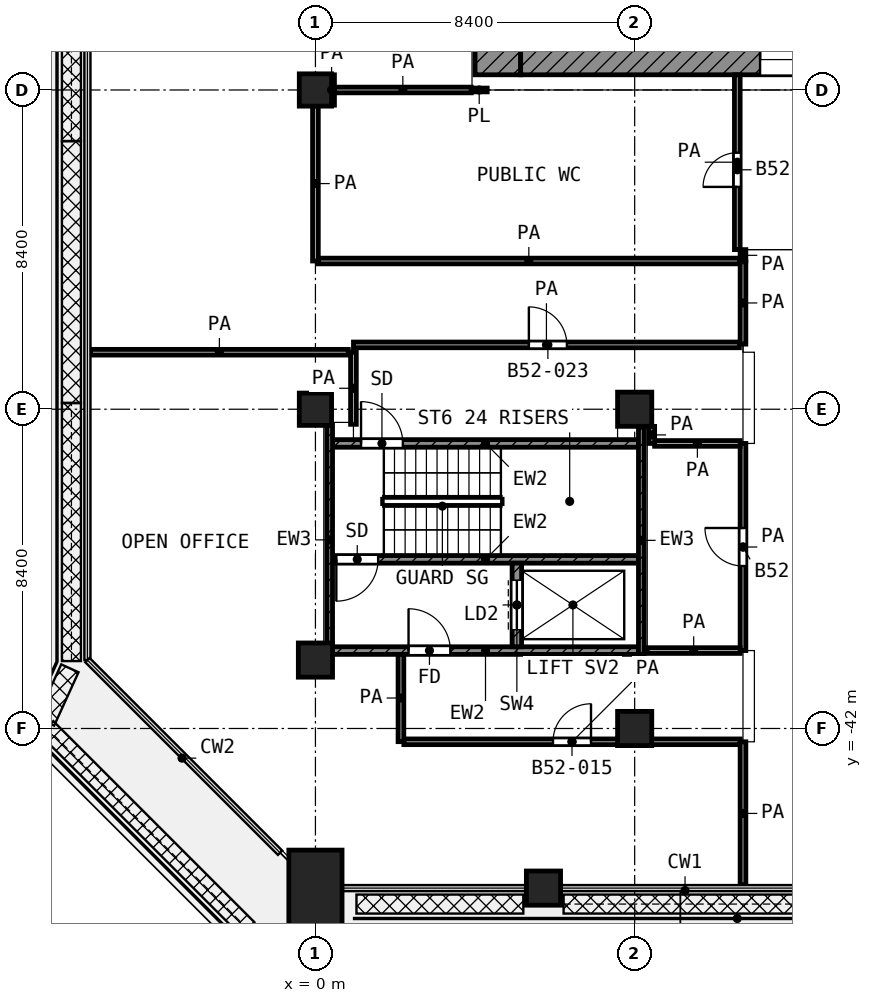
"""IFC4 building model, lengths in metres.
Left out: names, types, materials, properties, quantities, classifications, styles, units other than length and angle.
Written with IfcOpenShell. Run it as: python <this file> out.ifc"""

import sys

from ifc_helpers import new_model, si_unit, direction, frame, frame_2d, origin, origin_2d, place, context, subcontext, project, spatial, rectangle, extrude, element, fill, save


model = new_model("IFC4")
c1 = context("Model", 3, precision=1e-05, world=origin(), true_north=direction((0.0, 1.0)))
c2 = subcontext(c1, "Body", "Model", "MODEL_VIEW")
j1 = project(units=[si_unit("LENGTHUNIT", "METRE"), si_unit("PLANEANGLEUNIT", "RADIAN")], contexts=[c1])
p1 = place(None, origin())
s1 = spatial("IfcSite", under=j1, at=p1, CompositionType="ELEMENT")
p2 = place(p1, origin())
s2 = spatial("IfcBuilding", under=s1, at=p2, CompositionType="ELEMENT")
p3 = place(p2, frame((0.0, 0.0, 226.4)))
s3 = spatial("IfcBuildingStorey", under=s2, at=p3, CompositionType="ELEMENT", Elevation=226.4)
for number, where, z_axis, x_axis in (
    (1, (0.0, -25.2, 0.0), (0.0, 0.0, 1.0), (1.0, 0.0, 0.0)),
    (2, (0.0, -33.6, 0.0), (0.0, 0.0, 1.0), (1.0, 0.0, 0.0)),
):
    element("IfcColumn", number, at=place(p3, frame(where, z_axis=z_axis, x_axis=x_axis)), inside=s3, PredefinedType="COLUMN", context=c2, shape_type="SweptSolid", body=[
        extrude(rectangle(XDim=0.85, YDim=0.85, at=origin_2d()), origin(), (0.0, 0.0, 1.0), 4.2),
    ])
for number, where, z_axis, x_axis in (
    (3, (8.4, -33.6, 0.0), (0.0, 0.0, 1.0), (1.0, 0.0, 0.0)),
    (4, (0.0, -40.2, 0.0), (0.0, 0.0, 1.0), (1.0, 0.0, 0.0)),
    (5, (8.4, -42.0, 0.0), (0.0, 0.0, 1.0), (1.0, 0.0, 0.0)),
    (6, (6.0, -46.2, 0.0), (0.0, 0.0, 1.0), (1.0, 0.0, 0.0)),
):
    element("IfcColumn", number, at=place(p3, frame(where, z_axis=z_axis, x_axis=x_axis)), inside=s3, PredefinedType="COLUMN", context=c2, shape_type="SweptSolid", body=[
        extrude(rectangle(XDim=0.9, YDim=0.9, at=origin_2d()), origin(), (0.0, 0.0, 1.0), 4.2),
    ])
p4 = place(p3, frame((0.0, -46.2, 0.0), z_axis=(0.0, 0.0, 1.0), x_axis=(0.0, 1.0, 0.0)))
e7 = element("IfcColumn", 7, at=p4, inside=s3, PredefinedType="COLUMN", context=c2, shape_type="SweptSolid", body=[
    extrude(rectangle(XDim=2.0, YDim=1.4, at=origin_2d()), origin(), (0.0, 0.0, 1.0), 4.2),
])
p5 = place(p3, frame((4.8, -24.8, 0.0), z_axis=(0.0, 0.0, 1.0), x_axis=(0.0, 1.0, 0.0)))
e8 = element("IfcWall", 8, at=p5, inside=s3, PredefinedType="SHEAR", context=c2, shape_type="SweptSolid", body=[
    extrude(rectangle(XDim=19.4, YDim=1.2, at=frame_2d((9.7, 0.0))), origin(), (0.0, 0.0, 1.0), 3.6),
])
p6 = place(p5, frame((11.25, 0.0, 0.0)))
e9 = element("IfcOpeningElement", 9, at=p6, cuts=e8, PredefinedType="OPENING", context=c2, shape_type="SweptSolid", body=[
    extrude(rectangle(XDim=1.1, YDim=2.1, at=frame_2d((0.55, 1.05))), frame((0.0, 0.61, 0.0), z_axis=(0.0, -1.0, 0.0), x_axis=(1.0, 0.0, 0.0)), (0.0, 0.0, 1.0), 1.22),
])
p7 = place(p5, frame((1.95, 0.0, 0.0)))
e10 = element("IfcOpeningElement", 10, at=p7, cuts=e8, PredefinedType="OPENING", context=c2, shape_type="SweptSolid", body=[
    extrude(rectangle(XDim=1.1, YDim=2.1, at=frame_2d((0.55, 1.05))), frame((0.0, 0.61, 0.0), z_axis=(0.0, -1.0, 0.0), x_axis=(1.0, 0.0, 0.0)), (0.0, 0.0, 1.0), 1.22),
])
p8 = place(p3, frame((5.4, -24.4, 0.0), z_axis=(0.0, 0.0, 1.0), x_axis=(1.0, 0.0, 0.0)))
e11 = element("IfcWall", 11, at=p8, inside=s3, PredefinedType="SHEAR", context=c2, shape_type="SweptSolid", body=[
    extrude(rectangle(XDim=18.6, YDim=0.8, at=frame_2d((9.3, 0.0))), origin(), (0.0, 0.0, 1.0), 3.6),
])
p9 = place(p8, frame((6.3, 0.0, 0.0)))
e12 = element("IfcOpeningElement", 12, at=p9, cuts=e11, PredefinedType="OPENING", context=c2, shape_type="SweptSolid", body=[
    extrude(rectangle(XDim=1.8, YDim=2.1, at=frame_2d((0.9, 1.05))), frame((0.0, 0.41, 0.0), z_axis=(0.0, -1.0, 0.0), x_axis=(1.0, 0.0, 0.0)), (0.0, 0.0, 1.0), 0.82),
])
p10 = place(p3, frame((0.375, -40.05, 0.0), z_axis=(0.0, 0.0, 1.0), x_axis=(0.0, 1.0, 0.0)))
e13 = element("IfcWall", 13, at=p10, inside=s3, PredefinedType="SHEAR", context=c2, shape_type="SweptSolid", body=[
    extrude(rectangle(XDim=6.025, YDim=0.15, at=frame_2d((3.013, 0.0))), origin(), (0.0, 0.0, 1.0), 3.6),
])
p11 = place(p3, frame((8.575, -40.05, 0.0), z_axis=(0.0, 0.0, 1.0), x_axis=(0.0, 1.0, 0.0)))
e14 = element("IfcWall", 14, at=p11, inside=s3, PredefinedType="SHEAR", context=c2, shape_type="SweptSolid", body=[
    extrude(rectangle(XDim=6.0, YDim=0.15, at=frame_2d((3.0, 0.0))), origin(), (0.0, 0.0, 1.0), 3.6),
])
p12 = place(p3, frame((0.45, -34.5, 0.0), z_axis=(0.0, 0.0, 1.0), x_axis=(1.0, 0.0, 0.0)))
e15 = element("IfcWall", 15, at=p12, inside=s3, PredefinedType="SHEAR", context=c2, shape_type="SweptSolid", body=[
    extrude(rectangle(XDim=8.05, YDim=0.2, at=frame_2d((4.025, 0.0))), origin(), (0.0, 0.0, 1.0), 3.6),
])
p13 = place(p12, frame((0.75, 0.0, 0.0)))
e16 = element("IfcOpeningElement", 16, at=p13, cuts=e15, PredefinedType="OPENING", context=c2, shape_type="SweptSolid", body=[
    extrude(rectangle(XDim=1.1, YDim=2.1, at=frame_2d((0.55, 1.05))), frame((0.0, 0.11, 0.0), z_axis=(0.0, -1.0, 0.0), x_axis=(1.0, 0.0, 0.0)), (0.0, 0.0, 1.0), 0.22),
])
p14 = place(p3, frame((0.45, -37.55, 0.0), z_axis=(0.0, 0.0, 1.0), x_axis=(1.0, 0.0, 0.0)))
e17 = element("IfcWall", 17, at=p14, inside=s3, PredefinedType="SHEAR", context=c2, shape_type="SweptSolid", body=[
    extrude(rectangle(XDim=8.05, YDim=0.2, at=frame_2d((4.025, 0.0))), origin(), (0.0, 0.0, 1.0), 3.6),
])
p15 = place(p14, frame((0.1, 0.0, 0.0)))
e18 = element("IfcOpeningElement", 18, at=p15, cuts=e17, PredefinedType="OPENING", context=c2, shape_type="SweptSolid", body=[
    extrude(rectangle(XDim=1.1, YDim=2.1, at=frame_2d((0.55, 1.05))), frame((0.0, 0.11, 0.0), z_axis=(0.0, -1.0, 0.0), x_axis=(1.0, 0.0, 0.0)), (0.0, 0.0, 1.0), 0.22),
])
p16 = place(p3, frame((0.45, -39.95, 0.0), z_axis=(0.0, 0.0, 1.0), x_axis=(1.0, 0.0, 0.0)))
e19 = element("IfcWall", 19, at=p16, inside=s3, PredefinedType="SHEAR", context=c2, shape_type="SweptSolid", body=[
    extrude(rectangle(XDim=8.05, YDim=0.2, at=frame_2d((4.025, 0.0))), origin(), (0.0, 0.0, 1.0), 3.6),
])
p17 = place(p16, frame((2.0, 0.0, 0.0)))
e20 = element("IfcOpeningElement", 20, at=p17, cuts=e19, PredefinedType="OPENING", context=c2, shape_type="SweptSolid", body=[
    extrude(rectangle(XDim=1.1, YDim=2.1, at=frame_2d((0.55, 1.05))), frame((0.0, 0.11, 0.0), z_axis=(0.0, -1.0, 0.0), x_axis=(1.0, 0.0, 0.0)), (0.0, 0.0, 1.0), 0.22),
])
p18 = place(p3, frame((5.3, -39.85, 0.0), z_axis=(0.0, 0.0, 1.0), x_axis=(0.0, 1.0, 0.0)))
e21 = element("IfcWall", 21, at=p18, inside=s3, PredefinedType="SHEAR", context=c2, shape_type="SweptSolid", body=[
    extrude(rectangle(XDim=2.2, YDim=0.25, at=frame_2d((1.1, 0.0))), origin(), (0.0, 0.0, 1.0), 3.6),
])
p19 = place(p18, frame((0.45, 0.0, 0.0)))
e22 = element("IfcOpeningElement", 22, at=p19, cuts=e21, PredefinedType="OPENING", context=c2, shape_type="SweptSolid", body=[
    extrude(rectangle(XDim=1.3, YDim=2.1, at=frame_2d((0.65, 1.05))), frame((0.0, 0.135, 0.0), z_axis=(0.0, -1.0, 0.0), x_axis=(1.0, 0.0, 0.0)), (0.0, 0.0, 1.0), 0.27),
])
p20 = place(p3, frame((4.1, -25.2, 0.0), z_axis=(0.0, 0.0, 1.0), x_axis=(1.0, 0.0, 0.0)))
e23 = element("IfcWall", 23, at=p20, inside=s3, PredefinedType="PARTITIONING", context=c2, shape_type="SweptSolid", body=[
    extrude(rectangle(XDim=0.419, YDim=0.1, at=frame_2d((0.209, 0.0))), origin(), (0.0, 0.0, 1.0), 3.6),
])
p21 = place(p3, frame((2.327, -42.35, 0.0), z_axis=(0.0, 0.0, 1.0), x_axis=(1.0, 0.0, 0.0)))
e24 = element("IfcWall", 24, at=p21, inside=s3, PredefinedType="PARTITIONING", context=c2, shape_type="SweptSolid", body=[
    extrude(rectangle(XDim=8.848, YDim=0.15, at=frame_2d((4.424, 0.0))), origin(), (0.0, 0.0, 1.0), 3.6),
])
p22 = place(p21, frame((3.924, 0.0, 0.0)))
e25 = element("IfcOpeningElement", 25, at=p22, cuts=e24, PredefinedType="OPENING", context=c2, shape_type="SweptSolid", body=[
    extrude(rectangle(XDim=1.0, YDim=2.1, at=frame_2d((0.5, 1.05))), frame((0.0, 0.085, 0.0), z_axis=(0.0, -1.0, 0.0), x_axis=(1.0, 0.0, 0.0)), (0.0, 0.0, 1.0), 0.17),
])
p23 = place(p3, frame((8.73, -39.95, 0.0), z_axis=(0.0, 0.0, 1.0), x_axis=(1.0, 0.0, 0.0)))
e26 = element("IfcWall", 26, at=p23, inside=s3, PredefinedType="PARTITIONING", context=c2, shape_type="SweptSolid", body=[
    extrude(rectangle(XDim=2.445, YDim=0.15, at=frame_2d((1.223, 0.0))), origin(), (0.0, 0.0, 1.0), 3.6),
])
p24 = place(p3, frame((8.925, -34.5, 0.0), z_axis=(0.0, 0.0, 1.0), x_axis=(1.0, 0.0, 0.0)))
e27 = element("IfcWall", 27, at=p24, inside=s3, PredefinedType="PARTITIONING", context=c2, shape_type="SweptSolid", body=[
    extrude(rectangle(XDim=2.25, YDim=0.15, at=frame_2d((1.125, 0.0))), origin(), (0.0, 0.0, 1.0), 3.6),
])
p25 = place(p3, frame((-5.92, -32.1, 0.0), z_axis=(0.0, 0.0, 1.0), x_axis=(1.0, 0.0, 0.0)))
e28 = element("IfcWall", 28, at=p25, inside=s3, PredefinedType="PARTITIONING", context=c2, shape_type="SweptSolid", body=[
    extrude(rectangle(XDim=6.785, YDim=0.15, at=frame_2d((3.393, 0.0))), origin(), (0.0, 0.0, 1.0), 3.6),
])
p26 = place(p3, frame((1.001, -31.907, 0.0), z_axis=(0.0, 0.0, 1.0), x_axis=(1.0, 0.0, 0.0)))
e29 = element("IfcWall", 29, at=p26, inside=s3, PredefinedType="PARTITIONING", context=c2, shape_type="SweptSolid", body=[
    extrude(rectangle(XDim=10.154, YDim=0.15, at=frame_2d((5.077, 0.0))), origin(), (0.0, 0.0, 1.0), 3.6),
])
p27 = place(p26, frame((4.615, 0.0, 0.0)))
e30 = element("IfcOpeningElement", 30, at=p27, cuts=e29, PredefinedType="OPENING", context=c2, shape_type="SweptSolid", body=[
    extrude(rectangle(XDim=1.0, YDim=2.1, at=frame_2d((0.5, 1.05))), frame((0.0, 0.085, 0.0), z_axis=(0.0, -1.0, 0.0), x_axis=(1.0, 0.0, 0.0)), (0.0, 0.0, 1.0), 0.17),
])
p28 = place(p3, frame((0.075, -29.7, 0.0), z_axis=(0.0, 0.0, 1.0), x_axis=(1.0, 0.0, 0.0)))
e31 = element("IfcWall", 31, at=p28, inside=s3, PredefinedType="PARTITIONING", context=c2, shape_type="SweptSolid", body=[
    extrude(rectangle(XDim=11.08, YDim=0.15, at=frame_2d((5.54, 0.0))), origin(), (0.0, 0.0, 1.0), 3.6),
])
p29 = place(p3, frame((0.5, -25.2, 0.0), z_axis=(0.0, 0.0, 1.0), x_axis=(1.0, 0.0, 0.0)))
e32 = element("IfcWall", 32, at=p29, inside=s3, PredefinedType="PARTITIONING", context=c2, shape_type="SweptSolid", body=[
    extrude(rectangle(XDim=3.6, YDim=0.15, at=frame_2d((1.8, 0.0))), origin(), (0.0, 0.0, 1.0), 3.6),
])
p30 = place(p3, frame((0.0, -29.7, 0.0), z_axis=(0.0, 0.0, 1.0), x_axis=(0.0, 1.0, 0.0)))
e33 = element("IfcWall", 33, at=p30, inside=s3, PredefinedType="PARTITIONING", context=c2, shape_type="SweptSolid", body=[
    extrude(rectangle(XDim=4.075, YDim=0.15, at=frame_2d((2.038, 0.0))), origin(), (0.0, 0.0, 1.0), 3.6),
])
p31 = place(p3, frame((0.425, -25.6, 0.0), z_axis=(0.0, 0.0, 1.0), x_axis=(0.0, 1.0, 0.0)))
e34 = element("IfcWall", 34, at=p31, inside=s3, PredefinedType="PARTITIONING", context=c2, shape_type="SweptSolid", body=[
    extrude(rectangle(XDim=0.8, YDim=0.15, at=frame_2d((0.4, 0.0))), origin(), (0.0, 0.0, 1.0), 3.6),
])
p32 = place(p3, frame((1.0, -33.997, 0.0), z_axis=(0.0, 0.0, 1.0), x_axis=(0.0, 1.0, 0.0)))
e35 = element("IfcWall", 35, at=p32, inside=s3, PredefinedType="PARTITIONING", context=c2, shape_type="SweptSolid", body=[
    extrude(rectangle(XDim=1.897, YDim=0.15, at=frame_2d((0.948, 0.0))), origin(), (0.0, 0.0, 1.0), 3.6),
])
p33 = place(p3, frame((2.25, -42.347, 0.0), z_axis=(0.0, 0.0, 1.0), x_axis=(0.0, 1.0, 0.0)))
e36 = element("IfcWall", 36, at=p33, inside=s3, PredefinedType="PARTITIONING", context=c2, shape_type="SweptSolid", body=[
    extrude(rectangle(XDim=2.297, YDim=0.15, at=frame_2d((1.148, 0.0))), origin(), (0.0, 0.0, 1.0), 3.6),
])
p34 = place(p3, frame((8.85, -34.5, 0.0), z_axis=(0.0, 0.0, 1.0), x_axis=(0.0, 1.0, 0.0)))
e37 = element("IfcWall", 37, at=p34, inside=s3, PredefinedType="PARTITIONING", context=c2, shape_type="SweptSolid", body=[
    extrude(rectangle(XDim=0.449, YDim=0.15, at=frame_2d((0.225, 0.0))), origin(), (0.0, 0.0, 1.0), 3.6),
])
p35 = place(p3, frame((11.1, -29.4, 0.0), z_axis=(0.0, 0.0, 1.0), x_axis=(0.0, 1.0, 0.0)))
e38 = element("IfcWall", 38, at=p35, inside=s3, PredefinedType="PARTITIONING", context=c2, shape_type="SweptSolid", body=[
    extrude(rectangle(XDim=4.6, YDim=0.15, at=frame_2d((2.3, 0.0))), origin(), (0.0, 0.0, 1.0), 3.6),
])
p36 = place(p35, frame((1.65, 0.0, 0.0)))
e39 = element("IfcOpeningElement", 39, at=p36, cuts=e38, PredefinedType="OPENING", context=c2, shape_type="SweptSolid", body=[
    extrude(rectangle(XDim=0.9, YDim=2.1, at=frame_2d((0.45, 1.05))), frame((0.0, 0.085, 0.0), z_axis=(0.0, -1.0, 0.0), x_axis=(1.0, 0.0, 0.0)), (0.0, 0.0, 1.0), 0.17),
])
p37 = place(p3, frame((11.25, -46.12, 0.0), z_axis=(0.0, 0.0, 1.0), x_axis=(0.0, 1.0, 0.0)))
e40 = element("IfcWall", 40, at=p37, inside=s3, PredefinedType="PARTITIONING", context=c2, shape_type="SweptSolid", body=[
    extrude(rectangle(XDim=3.77, YDim=0.15, at=frame_2d((1.885, 0.0))), origin(), (0.0, 0.0, 1.0), 3.6),
])
p38 = place(p3, frame((11.25, -39.95, 0.0), z_axis=(0.0, 0.0, 1.0), x_axis=(0.0, 1.0, 0.0)))
e41 = element("IfcWall", 41, at=p38, inside=s3, PredefinedType="PARTITIONING", context=c2, shape_type="SweptSolid", body=[
    extrude(rectangle(XDim=5.45, YDim=0.15, at=frame_2d((2.725, 0.0))), origin(), (0.0, 0.0, 1.0), 3.6),
])
p39 = place(p38, frame((2.225, 0.0, 0.0)))
e42 = element("IfcOpeningElement", 42, at=p39, cuts=e41, PredefinedType="OPENING", context=c2, shape_type="SweptSolid", body=[
    extrude(rectangle(XDim=1.0, YDim=2.1, at=frame_2d((0.5, 1.05))), frame((0.0, 0.085, 0.0), z_axis=(0.0, -1.0, 0.0), x_axis=(1.0, 0.0, 0.0)), (0.0, 0.0, 1.0), 0.17),
])
p40 = place(p3, frame((11.25, -31.887, 0.0), z_axis=(0.0, 0.0, 1.0), x_axis=(0.0, 1.0, 0.0)))
e43 = element("IfcWall", 43, at=p40, inside=s3, PredefinedType="PARTITIONING", context=c2, shape_type="SweptSolid", body=[
    extrude(rectangle(XDim=2.167, YDim=0.15, at=frame_2d((1.083, 0.0))), origin(), (0.0, 0.0, 1.0), 3.6),
])
p41 = place(p3, frame((11.25, -29.7, 0.0), z_axis=(0.0, 0.0, 1.0), x_axis=(0.0, 1.0, 0.0)))
e44 = element("IfcWall", 44, at=p41, inside=s3, PredefinedType="PARTITIONING", context=c2, shape_type="SweptSolid", body=[
    extrude(rectangle(XDim=0.3, YDim=0.15, at=frame_2d((0.15, 0.0))), origin(), (0.0, 0.0, 1.0), 3.6),
])
p42 = place(p9, origin())
e45 = element("IfcDoor", 45, at=p42, inside=s3, OperationType="DOUBLE_DOOR_SINGLE_SWING", PredefinedType="DOOR", context=c2, shape_type="SweptSolid", body=[
    extrude(rectangle(XDim=1.8, YDim=2.1, at=frame_2d((0.9, 1.05))), frame((0.0, 0.025, 0.0), z_axis=(0.0, -1.0, 0.0), x_axis=(1.0, 0.0, 0.0)), (0.0, 0.0, 1.0), 0.05),
])
fill(e12, e45)
p43 = place(p13, origin())
e46 = element("IfcDoor", 46, at=p43, inside=s3, OperationType="SINGLE_SWING_LEFT", PredefinedType="DOOR", context=c2, shape_type="SweptSolid", body=[
    extrude(rectangle(XDim=1.1, YDim=2.1, at=frame_2d((0.55, 1.05))), frame((0.0, 0.025, 0.0), z_axis=(0.0, -1.0, 0.0), x_axis=(1.0, 0.0, 0.0)), (0.0, 0.0, 1.0), 0.05),
])
fill(e16, e46)
p44 = place(p15, frame((1.1, 0.0, 0.0), z_axis=(0.0, 0.0, 1.0), x_axis=(-1.0, 0.0, 0.0)))
e47 = element("IfcDoor", 47, at=p44, inside=s3, OperationType="SINGLE_SWING_LEFT", PredefinedType="DOOR", context=c2, shape_type="SweptSolid", body=[
    extrude(rectangle(XDim=1.1, YDim=2.1, at=frame_2d((0.55, 1.05))), frame((0.0, 0.025, 0.0), z_axis=(0.0, -1.0, 0.0), x_axis=(1.0, 0.0, 0.0)), (0.0, 0.0, 1.0), 0.05),
])
fill(e18, e47)
p45 = place(p19, origin())
e48 = element("IfcDoor", 48, at=p45, inside=s3, OperationType="DOUBLE_DOOR_SLIDING", PredefinedType="DOOR", context=c2, shape_type="SweptSolid", body=[
    extrude(rectangle(XDim=1.3, YDim=2.1, at=frame_2d((0.65, 1.05))), frame((0.0, 0.025, 0.0), z_axis=(0.0, -1.0, 0.0), x_axis=(1.0, 0.0, 0.0)), (0.0, 0.0, 1.0), 0.05),
])
fill(e22, e48)
p46 = place(p17, origin())
e49 = element("IfcDoor", 49, at=p46, inside=s3, OperationType="SINGLE_SWING_LEFT", PredefinedType="DOOR", context=c2, shape_type="SweptSolid", body=[
    extrude(rectangle(XDim=1.1, YDim=2.1, at=frame_2d((0.55, 1.05))), frame((0.0, 0.025, 0.0), z_axis=(0.0, -1.0, 0.0), x_axis=(1.0, 0.0, 0.0)), (0.0, 0.0, 1.0), 0.05),
])
fill(e20, e49)
p47 = place(p36, origin())
e50 = element("IfcDoor", 50, at=p47, inside=s3, OperationType="SINGLE_SWING_LEFT", PredefinedType="DOOR", context=c2, shape_type="SweptSolid", body=[
    extrude(rectangle(XDim=0.9, YDim=2.1, at=frame_2d((0.45, 1.05))), frame((0.0, 0.025, 0.0), z_axis=(0.0, -1.0, 0.0), x_axis=(1.0, 0.0, 0.0)), (0.0, 0.0, 1.0), 0.05),
])
fill(e39, e50)
p48 = place(p22, origin())
e51 = element("IfcDoor", 51, at=p48, inside=s3, OperationType="SINGLE_SWING_RIGHT", PredefinedType="DOOR", context=c2, shape_type="SweptSolid", body=[
    extrude(rectangle(XDim=1.0, YDim=2.1, at=frame_2d((0.5, 1.05))), frame((0.0, 0.025, 0.0), z_axis=(0.0, -1.0, 0.0), x_axis=(1.0, 0.0, 0.0)), (0.0, 0.0, 1.0), 0.05),
])
fill(e25, e51)
p49 = place(p27, origin())
e52 = element("IfcDoor", 52, at=p49, inside=s3, OperationType="SINGLE_SWING_LEFT", PredefinedType="DOOR", context=c2, shape_type="SweptSolid", body=[
    extrude(rectangle(XDim=1.0, YDim=2.1, at=frame_2d((0.5, 1.05))), frame((0.0, 0.025, 0.0), z_axis=(0.0, -1.0, 0.0), x_axis=(1.0, 0.0, 0.0)), (0.0, 0.0, 1.0), 0.05),
])
fill(e30, e52)
p50 = place(p39, origin())
e53 = element("IfcDoor", 53, at=p50, inside=s3, OperationType="SINGLE_SWING_RIGHT", PredefinedType="DOOR", context=c2, shape_type="SweptSolid", body=[
    extrude(rectangle(XDim=1.0, YDim=2.1, at=frame_2d((0.5, 1.05))), frame((0.0, 0.025, 0.0), z_axis=(0.0, -1.0, 0.0), x_axis=(1.0, 0.0, 0.0)), (0.0, 0.0, 1.0), 0.05),
])
fill(e42, e53)
save(model, sys.argv[1])
